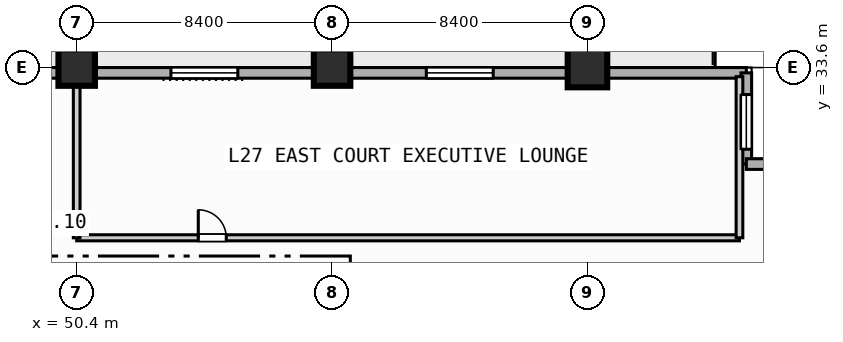
"""IFC4 building model, lengths in metres.
Left out: names, types, materials, properties, quantities, classifications, styles, units other than length and angle.
Written with IfcOpenShell. Run it as: python <this file> out.ifc"""

import sys

from ifc_helpers import new_model, si_unit, direction, frame, frame_2d, origin, origin_2d, place, context, subcontext, project, spatial, rectangle, extrude, element, fill, save


model = new_model("IFC4")
c1 = context("Model", 3, precision=1e-05, world=origin(), true_north=direction((0.0, 1.0)))
c2 = subcontext(c1, "Body", "Model", "MODEL_VIEW")
j1 = project(units=[si_unit("LENGTHUNIT", "METRE"), si_unit("PLANEANGLEUNIT", "RADIAN")], contexts=[c1])
p1 = place(None, origin())
s1 = spatial("IfcSite", under=j1, at=p1, CompositionType="ELEMENT")
p2 = place(p1, origin())
s2 = spatial("IfcBuilding", under=s1, at=p2, CompositionType="ELEMENT")
p3 = place(p2, frame((0.0, 0.0, 115.2)))
s3 = spatial("IfcBuildingStorey", under=s2, at=p3, CompositionType="ELEMENT", Elevation=115.2)
for number, where, z_axis, x_axis in (
    (1, (50.4, 33.6, 0.0), (0.0, 0.0, 1.0), (1.0, 0.0, 0.0)),
    (2, (58.8, 33.6, 0.0), (0.0, 0.0, 1.0), (1.0, 0.0, 0.0)),
):
    element("IfcColumn", number, at=place(p3, frame(where, z_axis=z_axis, x_axis=x_axis)), inside=s3, PredefinedType="COLUMN", context=c2, shape_type="SweptSolid", body=[
        extrude(rectangle(XDim=1.2, YDim=1.2, at=origin_2d()), origin(), (0.0, 0.0, 1.0), 3.8),
    ])
p4 = place(p3, frame((67.2, 33.6, 0.0), z_axis=(0.0, 0.0, 1.0), x_axis=(1.0, 0.0, 0.0)))
e3 = element("IfcColumn", 3, at=p4, inside=s3, PredefinedType="COLUMN", context=c2, shape_type="SweptSolid", body=[
    extrude(rectangle(XDim=1.3, YDim=1.3, at=origin_2d()), origin(), (0.0, 0.0, 1.0), 3.8),
])
p5 = place(p3, frame((33.425, 33.425, 0.0), z_axis=(0.0, 0.0, 1.0), x_axis=(1.0, 0.0, 0.0)))
e4 = element("IfcWall", 4, at=p5, inside=s3, PredefinedType="STANDARD", context=c2, shape_type="SweptSolid", body=[
    extrude(rectangle(XDim=39.0, YDim=0.35, at=frame_2d((19.5, 0.0))), origin(), (0.0, 0.0, 1.0), 3.55),
])
p6 = place(p5, frame((12.075, 0.0, 0.0)))
e5 = element("IfcOpeningElement", 5, at=p6, cuts=e4, PredefinedType="OPENING", context=c2, shape_type="SweptSolid", body=[
    extrude(rectangle(XDim=1.4, YDim=2.2, at=frame_2d((0.7, 1.1))), frame((0.0, 0.185, 0.0), z_axis=(0.0, -1.0, 0.0), x_axis=(1.0, 0.0, 0.0)), (0.0, 0.0, 1.0), 0.37),
])
p7 = place(p5, frame((20.075, 0.0, 0.85)))
e6 = element("IfcOpeningElement", 6, at=p7, cuts=e4, PredefinedType="OPENING", context=c2, shape_type="SweptSolid", body=[
    extrude(rectangle(XDim=2.2, YDim=1.8, at=frame_2d((1.1, 0.9))), frame((0.0, 0.185, 0.0), z_axis=(0.0, -1.0, 0.0), x_axis=(1.0, 0.0, 0.0)), (0.0, 0.0, 1.0), 0.37),
])
p8 = place(p5, frame((28.475, 0.0, 0.85)))
e7 = element("IfcOpeningElement", 7, at=p8, cuts=e4, PredefinedType="OPENING", context=c2, shape_type="SweptSolid", body=[
    extrude(rectangle(XDim=2.2, YDim=1.8, at=frame_2d((1.1, 0.9))), frame((0.0, 0.185, 0.0), z_axis=(0.0, -1.0, 0.0), x_axis=(1.0, 0.0, 0.0)), (0.0, 0.0, 1.0), 0.37),
])
p9 = place(p3, frame((72.425, 33.425, 0.0), z_axis=(0.0, 0.0, 1.0), x_axis=(0.0, -1.0, 0.0)))
e8 = element("IfcWall", 8, at=p9, inside=s3, PredefinedType="STANDARD", context=c2, shape_type="SweptSolid", body=[
    extrude(rectangle(XDim=3.0, YDim=0.35, at=frame_2d((1.5, 0.0))), origin(), (0.0, 0.0, 1.0), 3.55),
])
p10 = place(p9, frame((0.712, 0.0, 0.85)))
e9 = element("IfcOpeningElement", 9, at=p10, cuts=e8, PredefinedType="OPENING", context=c2, shape_type="SweptSolid", body=[
    extrude(rectangle(XDim=1.8, YDim=1.8, at=frame_2d((0.9, 0.9))), frame((0.0, 0.185, 0.0), z_axis=(0.0, -1.0, 0.0), x_axis=(1.0, 0.0, 0.0)), (0.0, 0.0, 1.0), 0.37),
])
p11 = place(p3, frame((72.425, 30.425, 0.0), z_axis=(0.0, 0.0, 1.0), x_axis=(1.0, 0.0, 0.0)))
e10 = element("IfcWall", 10, at=p11, inside=s3, PredefinedType="STANDARD", context=c2, shape_type="SweptSolid", body=[
    extrude(rectangle(XDim=3.0, YDim=0.35, at=frame_2d((1.5, 0.0))), origin(), (0.0, 0.0, 1.0), 3.55),
])
p12 = place(p3, frame((50.4, 28.0, 0.0), z_axis=(0.0, 0.0, 1.0), x_axis=(1.0, 0.0, 0.0)))
e11 = element("IfcWall", 11, at=p12, inside=s3, PredefinedType="PARTITIONING", context=c2, shape_type="SweptSolid", body=[
    extrude(rectangle(XDim=21.8, YDim=0.2, at=frame_2d((10.9, 0.0))), origin(), (0.0, 0.0, 1.0), 3.55),
])
p13 = place(p12, frame((4.0, 0.0, 0.0)))
e12 = element("IfcOpeningElement", 12, at=p13, cuts=e11, PredefinedType="OPENING", context=c2, shape_type="SweptSolid", body=[
    extrude(rectangle(XDim=0.92, YDim=2.1, at=frame_2d((0.46, 1.05))), frame((0.0, 0.11, 0.0), z_axis=(0.0, -1.0, 0.0), x_axis=(1.0, 0.0, 0.0)), (0.0, 0.0, 1.0), 0.22),
])
p14 = place(p3, frame((50.4, 28.0, 0.0), z_axis=(0.0, 0.0, 1.0), x_axis=(0.0, 1.0, 0.0)))
e13 = element("IfcWall", 13, at=p14, inside=s3, PredefinedType="PARTITIONING", context=c2, shape_type="SweptSolid", body=[
    extrude(rectangle(XDim=5.3, YDim=0.22, at=frame_2d((2.65, 0.0))), origin(), (0.0, 0.0, 1.0), 3.007),
])
p15 = place(p3, frame((72.2, 28.0, 0.0), z_axis=(0.0, 0.0, 1.0), x_axis=(0.0, 1.0, 0.0)))
e14 = element("IfcWall", 14, at=p15, inside=s3, PredefinedType="PARTITIONING", context=c2, shape_type="SweptSolid", body=[
    extrude(rectangle(XDim=5.3, YDim=0.22, at=frame_2d((2.65, 0.0))), origin(), (0.0, 0.0, 1.0), 3.55),
])
p16 = place(p7, origin())
e15 = element("IfcWindow", 15, at=p16, inside=s3, PartitioningType="SINGLE_PANEL", PredefinedType="WINDOW", context=c2, shape_type="SweptSolid", body=[
    extrude(rectangle(XDim=2.2, YDim=1.8, at=frame_2d((1.1, 0.9))), frame((0.0, 0.03, 0.0), z_axis=(0.0, -1.0, 0.0), x_axis=(1.0, 0.0, 0.0)), (0.0, 0.0, 1.0), 0.06),
])
fill(e6, e15)
p17 = place(p8, origin())
e16 = element("IfcWindow", 16, at=p17, inside=s3, PartitioningType="SINGLE_PANEL", PredefinedType="WINDOW", context=c2, shape_type="SweptSolid", body=[
    extrude(rectangle(XDim=2.2, YDim=1.8, at=frame_2d((1.1, 0.9))), frame((0.0, 0.03, 0.0), z_axis=(0.0, -1.0, 0.0), x_axis=(1.0, 0.0, 0.0)), (0.0, 0.0, 1.0), 0.06),
])
fill(e7, e16)
p18 = place(p10, origin())
e17 = element("IfcWindow", 17, at=p18, inside=s3, PartitioningType="SINGLE_PANEL", PredefinedType="WINDOW", context=c2, shape_type="SweptSolid", body=[
    extrude(rectangle(XDim=1.8, YDim=1.8, at=frame_2d((0.9, 0.9))), frame((0.0, 0.03, 0.0), z_axis=(0.0, -1.0, 0.0), x_axis=(1.0, 0.0, 0.0)), (0.0, 0.0, 1.0), 0.06),
])
fill(e9, e17)
p19 = place(p13, origin())
e18 = element("IfcDoor", 18, at=p19, inside=s3, OperationType="SINGLE_SWING_LEFT", PredefinedType="DOOR", context=c2, shape_type="SweptSolid", body=[
    extrude(rectangle(XDim=0.92, YDim=2.1, at=frame_2d((0.46, 1.05))), frame((0.0, 0.025, 0.0), z_axis=(0.0, -1.0, 0.0), x_axis=(1.0, 0.0, 0.0)), (0.0, 0.0, 1.0), 0.05),
])
fill(e12, e18)
save(model, sys.argv[1])
